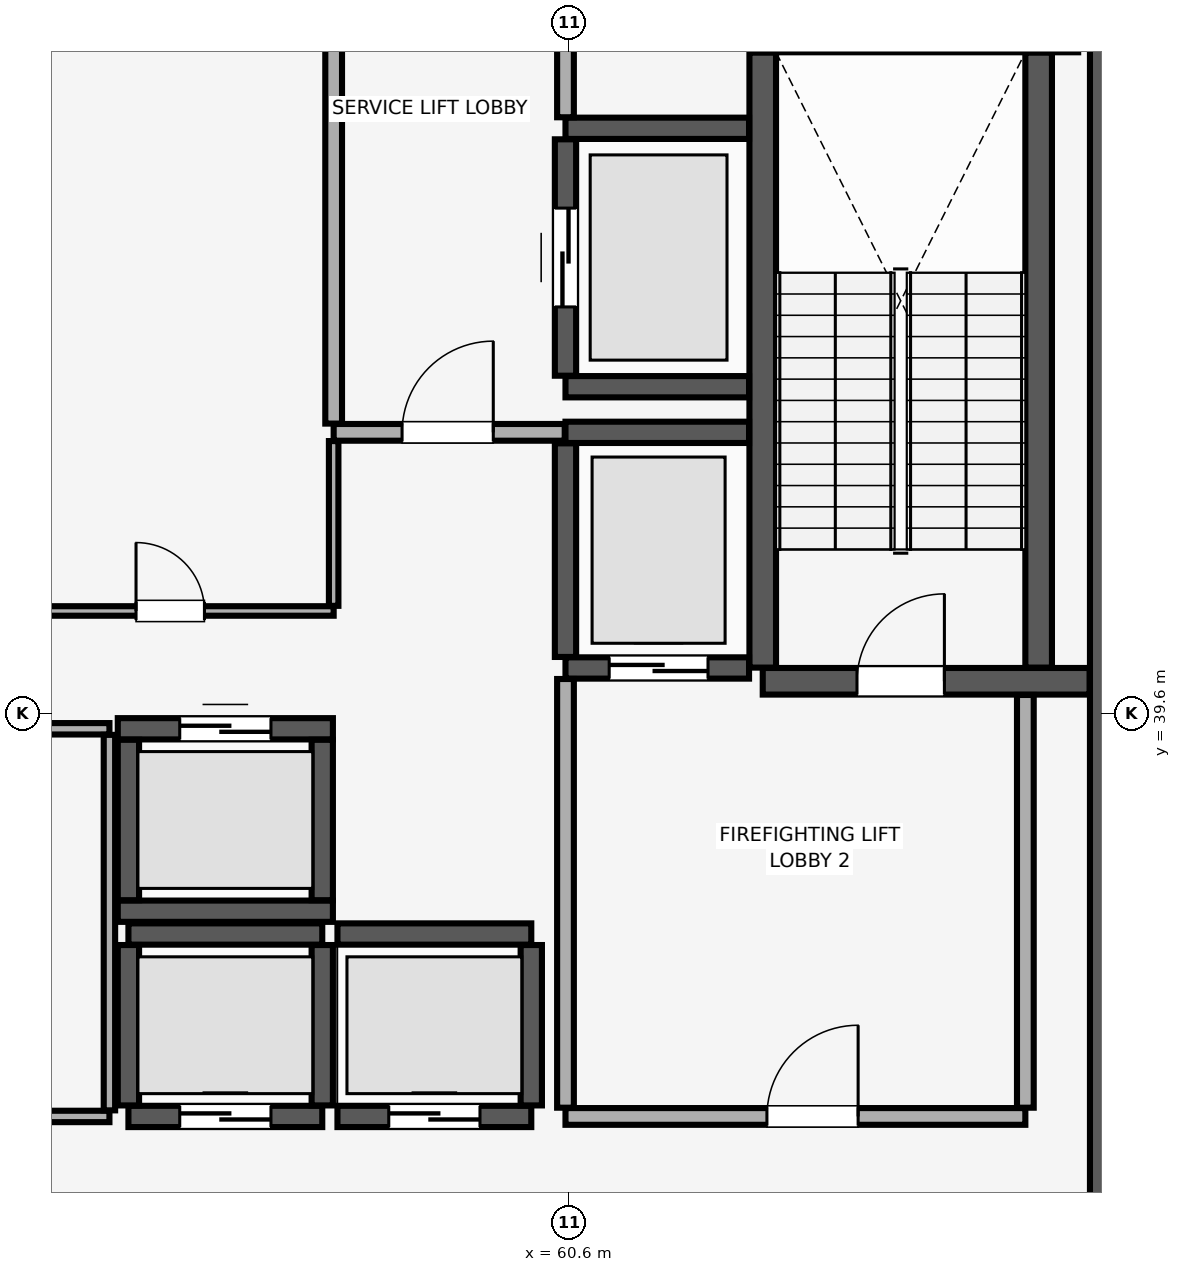
"""IFC4 building model, lengths in metres.
Left out: names, types, materials, properties, quantities, classifications, styles, units other than length and angle.
Written with IfcOpenShell. Run it as: python <this file> out.ifc"""

import sys

from ifc_helpers import new_model, si_unit, direction, frame, frame_2d, origin, place, context, subcontext, project, spatial, rectangle, extrude, element, fill, save


model = new_model("IFC4")
c1 = context("Model", 3, precision=1e-05, world=origin(), true_north=direction((0.0, 1.0)))
c2 = subcontext(c1, "Body", "Model", "MODEL_VIEW")
j1 = project(units=[si_unit("LENGTHUNIT", "METRE"), si_unit("PLANEANGLEUNIT", "RADIAN")], contexts=[c1])
p1 = place(None, origin())
s1 = spatial("IfcSite", under=j1, at=p1, CompositionType="ELEMENT")
p2 = place(p1, origin())
s2 = spatial("IfcBuilding", under=s1, at=p2, CompositionType="ELEMENT")
p3 = place(p2, frame((0.0, 0.0, 305.7)))
s3 = spatial("IfcBuildingStorey", under=s2, at=p3, CompositionType="ELEMENT", Elevation=305.7)
p4 = place(p3, frame((67.8, 29.4, 0.0), z_axis=(0.0, 0.0, 1.0), x_axis=(0.0, 1.0, 0.0)))
e1 = element("IfcWall", 1, at=p4, inside=s3, PredefinedType="SHEAR", context=c2, shape_type="SweptSolid", body=[
    extrude(rectangle(XDim=19.2, YDim=0.7, at=frame_2d((9.6, 0.0))), origin(), (0.0, 0.0, 1.0), 4.7),
])
p5 = place(p3, frame((63.145, 40.025, 0.0), z_axis=(0.0, 0.0, 1.0), x_axis=(1.0, 0.0, 0.0)))
e2 = element("IfcWall", 2, at=p5, inside=s3, PredefinedType="SHEAR", context=c2, shape_type="SweptSolid", body=[
    extrude(rectangle(XDim=4.3, YDim=0.35, at=frame_2d((2.15, 0.0))), origin(), (0.0, 0.0, 1.0), 4.7),
])
p6 = place(p5, frame((1.24, 0.0, 0.0)))
e3 = element("IfcOpeningElement", 3, at=p6, cuts=e2, PredefinedType="OPENING", context=c2, shape_type="SweptSolid", body=[
    extrude(rectangle(XDim=1.15, YDim=2.15, at=frame_2d((0.575, 1.075))), frame((0.0, 0.185, 0.0), z_axis=(0.0, -1.0, 0.0), x_axis=(1.0, 0.0, 0.0)), (0.0, 0.0, 1.0), 0.37),
])
for number, where, z_axis, x_axis in (
    (4, (63.145, 40.205, 0.0), (0.0, 0.0, 1.0), (0.0, 1.0, 0.0)),
    (5, (66.775, 40.205, 0.0), (0.0, 0.0, 1.0), (0.0, 1.0, 0.0)),
):
    element("IfcWall", number, at=place(p3, frame(where, z_axis=z_axis, x_axis=x_axis)), inside=s3, PredefinedType="SHEAR", context=c2, shape_type="SweptSolid", body=[
        extrude(rectangle(XDim=8.09, YDim=0.35, at=frame_2d((4.045, 0.0))), origin(), (0.0, 0.0, 1.0), 4.7),
    ])
p7 = place(p3, frame((54.8, 34.3, 0.0), z_axis=(0.0, 0.0, 1.0), x_axis=(1.0, 0.0, 0.0)))
e6 = element("IfcWall", 6, at=p7, inside=s3, PredefinedType="SHEAR", context=c2, shape_type="SweptSolid", body=[
    extrude(rectangle(XDim=2.55, YDim=0.28, at=frame_2d((1.275, 0.0))), origin(), (0.0, 0.0, 1.0), 4.7),
])
p8 = place(p7, frame((0.675, 0.0, 0.0)))
e7 = element("IfcOpeningElement", 7, at=p8, cuts=e6, PredefinedType="OPENING", context=c2, shape_type="SweptSolid", body=[
    extrude(rectangle(XDim=1.2, YDim=2.25, at=frame_2d((0.6, 1.125))), frame((0.0, 0.15, 0.0), z_axis=(0.0, -1.0, 0.0), x_axis=(1.0, 0.0, 0.0)), (0.0, 0.0, 1.0), 0.3),
])
p9 = place(p3, frame((54.8, 36.7, 0.0), z_axis=(0.0, 0.0, 1.0), x_axis=(1.0, 0.0, 0.0)))
e8 = element("IfcWall", 8, at=p9, inside=s3, PredefinedType="SHEAR", context=c2, shape_type="SweptSolid", body=[
    extrude(rectangle(XDim=2.55, YDim=0.28, at=frame_2d((1.275, 0.0))), origin(), (0.0, 0.0, 1.0), 4.7),
])
for number, where, z_axis, x_axis in (
    (9, (54.8, 34.445, 0.0), (0.0, 0.0, 1.0), (0.0, 1.0, 0.0)),
    (10, (57.35, 34.445, 0.0), (0.0, 0.0, 1.0), (0.0, 1.0, 0.0)),
):
    element("IfcWall", number, at=place(p3, frame(where, z_axis=z_axis, x_axis=x_axis)), inside=s3, PredefinedType="SHEAR", context=c2, shape_type="SweptSolid", body=[
        extrude(rectangle(XDim=2.11, YDim=0.28, at=frame_2d((1.055, 0.0))), origin(), (0.0, 0.0, 1.0), 4.7),
    ])
p10 = place(p3, frame((57.55, 34.3, 0.0), z_axis=(0.0, 0.0, 1.0), x_axis=(1.0, 0.0, 0.0)))
e11 = element("IfcWall", 11, at=p10, inside=s3, PredefinedType="SHEAR", context=c2, shape_type="SweptSolid", body=[
    extrude(rectangle(XDim=2.55, YDim=0.28, at=frame_2d((1.275, 0.0))), origin(), (0.0, 0.0, 1.0), 4.7),
])
p11 = place(p10, frame((0.675, 0.0, 0.0)))
e12 = element("IfcOpeningElement", 12, at=p11, cuts=e11, PredefinedType="OPENING", context=c2, shape_type="SweptSolid", body=[
    extrude(rectangle(XDim=1.2, YDim=2.25, at=frame_2d((0.6, 1.125))), frame((0.0, 0.15, 0.0), z_axis=(0.0, -1.0, 0.0), x_axis=(1.0, 0.0, 0.0)), (0.0, 0.0, 1.0), 0.3),
])
p12 = place(p3, frame((57.55, 36.7, 0.0), z_axis=(0.0, 0.0, 1.0), x_axis=(1.0, 0.0, 0.0)))
e13 = element("IfcWall", 13, at=p12, inside=s3, PredefinedType="SHEAR", context=c2, shape_type="SweptSolid", body=[
    extrude(rectangle(XDim=2.55, YDim=0.28, at=frame_2d((1.275, 0.0))), origin(), (0.0, 0.0, 1.0), 4.7),
])
p13 = place(p3, frame((60.1, 34.445, 0.0), z_axis=(0.0, 0.0, 1.0), x_axis=(0.0, 1.0, 0.0)))
e14 = element("IfcWall", 14, at=p13, inside=s3, PredefinedType="SHEAR", context=c2, shape_type="SweptSolid", body=[
    extrude(rectangle(XDim=2.11, YDim=0.28, at=frame_2d((1.055, 0.0))), origin(), (0.0, 0.0, 1.0), 4.7),
])
p14 = place(p3, frame((54.66, 37.0, 0.0), z_axis=(0.0, 0.0, 1.0), x_axis=(1.0, 0.0, 0.0)))
e15 = element("IfcWall", 15, at=p14, inside=s3, PredefinedType="SHEAR", context=c2, shape_type="SweptSolid", body=[
    extrude(rectangle(XDim=2.83, YDim=0.28, at=frame_2d((1.415, 0.0))), origin(), (0.0, 0.0, 1.0), 4.7),
])
p15 = place(p3, frame((54.66, 39.4, 0.0), z_axis=(0.0, 0.0, 1.0), x_axis=(1.0, 0.0, 0.0)))
e16 = element("IfcWall", 16, at=p15, inside=s3, PredefinedType="SHEAR", context=c2, shape_type="SweptSolid", body=[
    extrude(rectangle(XDim=2.83, YDim=0.28, at=frame_2d((1.415, 0.0))), origin(), (0.0, 0.0, 1.0), 4.7),
])
p16 = place(p15, frame((0.815, 0.0, 0.0)))
e17 = element("IfcOpeningElement", 17, at=p16, cuts=e16, PredefinedType="OPENING", context=c2, shape_type="SweptSolid", body=[
    extrude(rectangle(XDim=1.2, YDim=2.25, at=frame_2d((0.6, 1.125))), frame((0.0, 0.15, 0.0), z_axis=(0.0, -1.0, 0.0), x_axis=(1.0, 0.0, 0.0)), (0.0, 0.0, 1.0), 0.3),
])
for number, where, z_axis, x_axis in (
    (18, (54.8, 37.145, 0.0), (0.0, 0.0, 1.0), (0.0, 1.0, 0.0)),
    (19, (57.35, 37.145, 0.0), (0.0, 0.0, 1.0), (0.0, 1.0, 0.0)),
):
    element("IfcWall", number, at=place(p3, frame(where, z_axis=z_axis, x_axis=x_axis)), inside=s3, PredefinedType="SHEAR", context=c2, shape_type="SweptSolid", body=[
        extrude(rectangle(XDim=2.11, YDim=0.28, at=frame_2d((1.055, 0.0))), origin(), (0.0, 0.0, 1.0), 4.7),
    ])
p17 = place(p3, frame((60.55, 40.2, 0.0), z_axis=(0.0, 0.0, 1.0), x_axis=(1.0, 0.0, 0.0)))
e20 = element("IfcWall", 20, at=p17, inside=s3, PredefinedType="SHEAR", context=c2, shape_type="SweptSolid", body=[
    extrude(rectangle(XDim=2.415, YDim=0.28, at=frame_2d((1.208, 0.0))), origin(), (0.0, 0.0, 1.0), 4.7),
])
p18 = place(p17, frame((0.575, 0.0, 0.0)))
e21 = element("IfcOpeningElement", 21, at=p18, cuts=e20, PredefinedType="OPENING", context=c2, shape_type="SweptSolid", body=[
    extrude(rectangle(XDim=1.3, YDim=2.3, at=frame_2d((0.65, 1.15))), frame((0.0, 0.15, 0.0), z_axis=(0.0, -1.0, 0.0), x_axis=(1.0, 0.0, 0.0)), (0.0, 0.0, 1.0), 0.3),
])
p19 = place(p3, frame((60.55, 43.3, 0.0), z_axis=(0.0, 0.0, 1.0), x_axis=(1.0, 0.0, 0.0)))
e22 = element("IfcWall", 22, at=p19, inside=s3, PredefinedType="SHEAR", context=c2, shape_type="SweptSolid", body=[
    extrude(rectangle(XDim=2.415, YDim=0.28, at=frame_2d((1.208, 0.0))), origin(), (0.0, 0.0, 1.0), 4.7),
])
p20 = place(p3, frame((60.55, 40.345, 0.0), z_axis=(0.0, 0.0, 1.0), x_axis=(0.0, 1.0, 0.0)))
e23 = element("IfcWall", 23, at=p20, inside=s3, PredefinedType="SHEAR", context=c2, shape_type="SweptSolid", body=[
    extrude(rectangle(XDim=2.81, YDim=0.28, at=frame_2d((1.405, 0.0))), origin(), (0.0, 0.0, 1.0), 4.7),
])
for number, where, z_axis, x_axis in (
    (24, (60.55, 43.9, 0.0), (0.0, 0.0, 1.0), (1.0, 0.0, 0.0)),
    (25, (60.55, 47.3, 0.0), (0.0, 0.0, 1.0), (1.0, 0.0, 0.0)),
):
    element("IfcWall", number, at=place(p3, frame(where, z_axis=z_axis, x_axis=x_axis)), inside=s3, PredefinedType="SHEAR", context=c2, shape_type="SweptSolid", body=[
        extrude(rectangle(XDim=2.415, YDim=0.28, at=frame_2d((1.208, 0.0))), origin(), (0.0, 0.0, 1.0), 4.7),
    ])
p21 = place(p3, frame((60.55, 44.045, 0.0), z_axis=(0.0, 0.0, 1.0), x_axis=(0.0, 1.0, 0.0)))
e26 = element("IfcWall", 26, at=p21, inside=s3, PredefinedType="SHEAR", context=c2, shape_type="SweptSolid", body=[
    extrude(rectangle(XDim=3.11, YDim=0.28, at=frame_2d((1.555, 0.0))), origin(), (0.0, 0.0, 1.0), 4.7),
])
p22 = place(p21, frame((0.905, 0.0, 0.0)))
e27 = element("IfcOpeningElement", 27, at=p22, cuts=e26, PredefinedType="OPENING", context=c2, shape_type="SweptSolid", body=[
    extrude(rectangle(XDim=1.3, YDim=2.3, at=frame_2d((0.65, 1.15))), frame((0.0, 0.15, 0.0), z_axis=(0.0, -1.0, 0.0), x_axis=(1.0, 0.0, 0.0)), (0.0, 0.0, 1.0), 0.3),
])
p23 = place(p3, frame((60.55, 34.3, 0.0), z_axis=(0.0, 0.0, 1.0), x_axis=(1.0, 0.0, 0.0)))
e28 = element("IfcWall", 28, at=p23, inside=s3, PredefinedType="PARTITIONING", context=c2, shape_type="SweptSolid", body=[
    extrude(rectangle(XDim=6.05, YDim=0.22, at=frame_2d((3.025, 0.0))), origin(), (0.0, 0.0, 1.0), 4.7),
])
p24 = place(p23, frame((2.65, 0.0, 0.0)))
e29 = element("IfcOpeningElement", 29, at=p24, cuts=e28, PredefinedType="OPENING", context=c2, shape_type="SweptSolid", body=[
    extrude(rectangle(XDim=1.2, YDim=2.15, at=frame_2d((0.6, 1.075))), frame((0.0, 0.12, 0.0), z_axis=(0.0, -1.0, 0.0), x_axis=(1.0, 0.0, 0.0)), (0.0, 0.0, 1.0), 0.24),
])
p25 = place(p3, frame((60.55, 34.415, 0.0), z_axis=(0.0, 0.0, 1.0), x_axis=(0.0, 1.0, 0.0)))
e30 = element("IfcWall", 30, at=p25, inside=s3, PredefinedType="PARTITIONING", context=c2, shape_type="SweptSolid", body=[
    extrude(rectangle(XDim=5.64, YDim=0.22, at=frame_2d((2.82, 0.0))), origin(), (0.0, 0.0, 1.0), 4.7),
])
p26 = place(p3, frame((66.6, 34.415, 0.0), z_axis=(0.0, 0.0, 1.0), x_axis=(0.0, 1.0, 0.0)))
e31 = element("IfcWall", 31, at=p26, inside=s3, PredefinedType="PARTITIONING", context=c2, shape_type="SweptSolid", body=[
    extrude(rectangle(XDim=5.43, YDim=0.22, at=frame_2d((2.715, 0.0))), origin(), (0.0, 0.0, 1.0), 4.7),
])
p27 = place(p3, frame((57.5, 43.3, 0.0), z_axis=(0.0, 0.0, 1.0), x_axis=(1.0, 0.0, 0.0)))
e32 = element("IfcWall", 32, at=p27, inside=s3, PredefinedType="PARTITIONING", context=c2, shape_type="SweptSolid", body=[
    extrude(rectangle(XDim=3.04, YDim=0.22, at=frame_2d((1.52, 0.0))), origin(), (0.0, 0.0, 1.0), 4.7),
])
p28 = place(p27, frame((0.9, 0.0, 0.0)))
e33 = element("IfcOpeningElement", 33, at=p28, cuts=e32, PredefinedType="OPENING", context=c2, shape_type="SweptSolid", body=[
    extrude(rectangle(XDim=1.2, YDim=2.15, at=frame_2d((0.6, 1.075))), frame((0.0, 0.12, 0.0), z_axis=(0.0, -1.0, 0.0), x_axis=(1.0, 0.0, 0.0)), (0.0, 0.0, 1.0), 0.24),
])
p29 = place(p3, frame((57.5, 43.415, 0.0), z_axis=(0.0, 0.0, 1.0), x_axis=(0.0, 1.0, 0.0)))
e34 = element("IfcWall", 34, at=p29, inside=s3, PredefinedType="PARTITIONING", context=c2, shape_type="SweptSolid", body=[
    extrude(rectangle(XDim=5.435, YDim=0.22, at=frame_2d((2.718, 0.0))), origin(), (0.0, 0.0, 1.0), 4.7),
])
p30 = place(p3, frame((60.55, 47.445, 0.0), z_axis=(0.0, 0.0, 1.0), x_axis=(0.0, 1.0, 0.0)))
e35 = element("IfcWall", 35, at=p30, inside=s3, PredefinedType="PARTITIONING", context=c2, shape_type="SweptSolid", body=[
    extrude(rectangle(XDim=1.405, YDim=0.22, at=frame_2d((0.703, 0.0))), origin(), (0.0, 0.0, 1.0), 4.7),
])
p31 = place(p3, frame((46.6, 34.3, 0.0), z_axis=(0.0, 0.0, 1.0), x_axis=(1.0, 0.0, 0.0)))
e36 = element("IfcWall", 36, at=p31, inside=s3, PredefinedType="PARTITIONING", context=c2, shape_type="SweptSolid", body=[
    extrude(rectangle(XDim=7.95, YDim=0.15, at=frame_2d((3.975, 0.0))), origin(), (0.0, 0.0, 1.0), 4.7),
])
p32 = place(p31, frame((3.4, 0.0, 0.0)))
e37 = element("IfcOpeningElement", 37, at=p32, cuts=e36, PredefinedType="OPENING", context=c2, shape_type="SweptSolid", body=[
    extrude(rectangle(XDim=1.0, YDim=2.15, at=frame_2d((0.5, 1.075))), frame((0.0, 0.085, 0.0), z_axis=(0.0, -1.0, 0.0), x_axis=(1.0, 0.0, 0.0)), (0.0, 0.0, 1.0), 0.17),
])
p33 = place(p3, frame((46.6, 39.4, 0.0), z_axis=(0.0, 0.0, 1.0), x_axis=(1.0, 0.0, 0.0)))
e38 = element("IfcWall", 38, at=p33, inside=s3, PredefinedType="PARTITIONING", context=c2, shape_type="SweptSolid", body=[
    extrude(rectangle(XDim=7.95, YDim=0.15, at=frame_2d((3.975, 0.0))), origin(), (0.0, 0.0, 1.0), 4.7),
])
p34 = place(p3, frame((54.55, 34.38, 0.0), z_axis=(0.0, 0.0, 1.0), x_axis=(0.0, 1.0, 0.0)))
e39 = element("IfcWall", 39, at=p34, inside=s3, PredefinedType="PARTITIONING", context=c2, shape_type="SweptSolid", body=[
    extrude(rectangle(XDim=4.94, YDim=0.15, at=frame_2d((2.47, 0.0))), origin(), (0.0, 0.0, 1.0), 4.7),
])
p35 = place(p3, frame((53.268, 40.95, 0.0), z_axis=(0.0, 0.0, 1.0), x_axis=(1.0, 0.0, 0.0)))
e40 = element("IfcWall", 40, at=p35, inside=s3, PredefinedType="PARTITIONING", context=c2, shape_type="SweptSolid", body=[
    extrude(rectangle(XDim=4.232, YDim=0.125, at=frame_2d((2.116, 0.0))), origin(), (0.0, 0.0, 1.0), 4.7),
])
p36 = place(p35, frame((1.633, 0.0, 0.0)))
e41 = element("IfcOpeningElement", 41, at=p36, cuts=e40, PredefinedType="OPENING", context=c2, shape_type="SweptSolid", body=[
    extrude(rectangle(XDim=0.9, YDim=2.1, at=frame_2d((0.45, 1.05))), frame((0.0, 0.073, 0.0), z_axis=(0.0, -1.0, 0.0), x_axis=(1.0, 0.0, 0.0)), (0.0, 0.0, 1.0), 0.145),
])
p37 = place(p3, frame((57.5, 41.018, 0.0), z_axis=(0.0, 0.0, 1.0), x_axis=(0.0, 1.0, 0.0)))
e42 = element("IfcWall", 42, at=p37, inside=s3, PredefinedType="PARTITIONING", context=c2, shape_type="SweptSolid", body=[
    extrude(rectangle(XDim=2.167, YDim=0.125, at=frame_2d((1.084, 0.0))), origin(), (0.0, 0.0, 1.0), 4.7),
])
p38 = place(p6, origin())
e43 = element("IfcDoor", 43, at=p38, inside=s3, OperationType="SINGLE_SWING_RIGHT", PredefinedType="DOOR", context=c2, shape_type="SweptSolid", body=[
    extrude(rectangle(XDim=1.15, YDim=2.15, at=frame_2d((0.575, 1.075))), frame((0.0, 0.025, 0.0), z_axis=(0.0, -1.0, 0.0), x_axis=(1.0, 0.0, 0.0)), (0.0, 0.0, 1.0), 0.05),
])
fill(e3, e43)
p39 = place(p8, origin())
e44 = element("IfcDoor", 44, at=p39, inside=s3, OperationType="DOUBLE_DOOR_SLIDING", PredefinedType="DOOR", context=c2, shape_type="SweptSolid", body=[
    extrude(rectangle(XDim=1.2, YDim=2.25, at=frame_2d((0.6, 1.125))), frame((0.0, 0.025, 0.0), z_axis=(0.0, -1.0, 0.0), x_axis=(1.0, 0.0, 0.0)), (0.0, 0.0, 1.0), 0.05),
])
fill(e7, e44)
p40 = place(p11, origin())
e45 = element("IfcDoor", 45, at=p40, inside=s3, OperationType="DOUBLE_DOOR_SLIDING", PredefinedType="DOOR", context=c2, shape_type="SweptSolid", body=[
    extrude(rectangle(XDim=1.2, YDim=2.25, at=frame_2d((0.6, 1.125))), frame((0.0, 0.025, 0.0), z_axis=(0.0, -1.0, 0.0), x_axis=(1.0, 0.0, 0.0)), (0.0, 0.0, 1.0), 0.05),
])
fill(e12, e45)
p41 = place(p16, origin())
e46 = element("IfcDoor", 46, at=p41, inside=s3, OperationType="DOUBLE_DOOR_SLIDING", PredefinedType="DOOR", context=c2, shape_type="SweptSolid", body=[
    extrude(rectangle(XDim=1.2, YDim=2.25, at=frame_2d((0.6, 1.125))), frame((0.0, 0.025, 0.0), z_axis=(0.0, -1.0, 0.0), x_axis=(1.0, 0.0, 0.0)), (0.0, 0.0, 1.0), 0.05),
])
fill(e17, e46)
p42 = place(p18, origin())
e47 = element("IfcDoor", 47, at=p42, inside=s3, OperationType="DOUBLE_DOOR_SLIDING", PredefinedType="DOOR", context=c2, shape_type="SweptSolid", body=[
    extrude(rectangle(XDim=1.3, YDim=2.3, at=frame_2d((0.65, 1.15))), frame((0.0, 0.025, 0.0), z_axis=(0.0, -1.0, 0.0), x_axis=(1.0, 0.0, 0.0)), (0.0, 0.0, 1.0), 0.05),
])
fill(e21, e47)
p43 = place(p22, origin())
e48 = element("IfcDoor", 48, at=p43, inside=s3, OperationType="DOUBLE_DOOR_SLIDING", PredefinedType="DOOR", context=c2, shape_type="SweptSolid", body=[
    extrude(rectangle(XDim=1.3, YDim=2.3, at=frame_2d((0.65, 1.15))), frame((0.0, 0.025, 0.0), z_axis=(0.0, -1.0, 0.0), x_axis=(1.0, 0.0, 0.0)), (0.0, 0.0, 1.0), 0.05),
])
fill(e27, e48)
p44 = place(p24, origin())
e49 = element("IfcDoor", 49, at=p44, inside=s3, OperationType="SINGLE_SWING_RIGHT", PredefinedType="DOOR", context=c2, shape_type="SweptSolid", body=[
    extrude(rectangle(XDim=1.2, YDim=2.15, at=frame_2d((0.6, 1.075))), frame((0.0, 0.025, 0.0), z_axis=(0.0, -1.0, 0.0), x_axis=(1.0, 0.0, 0.0)), (0.0, 0.0, 1.0), 0.05),
])
fill(e29, e49)
p45 = place(p28, origin())
e50 = element("IfcDoor", 50, at=p45, inside=s3, OperationType="SINGLE_SWING_RIGHT", PredefinedType="DOOR", context=c2, shape_type="SweptSolid", body=[
    extrude(rectangle(XDim=1.2, YDim=2.15, at=frame_2d((0.6, 1.075))), frame((0.0, 0.025, 0.0), z_axis=(0.0, -1.0, 0.0), x_axis=(1.0, 0.0, 0.0)), (0.0, 0.0, 1.0), 0.05),
])
fill(e33, e50)
p46 = place(p36, origin())
e51 = element("IfcDoor", 51, at=p46, inside=s3, OperationType="SINGLE_SWING_LEFT", PredefinedType="DOOR", context=c2, shape_type="SweptSolid", body=[
    extrude(rectangle(XDim=0.9, YDim=2.1, at=frame_2d((0.45, 1.05))), frame((0.0, 0.025, 0.0), z_axis=(0.0, -1.0, 0.0), x_axis=(1.0, 0.0, 0.0)), (0.0, 0.0, 1.0), 0.05),
])
fill(e41, e51)
save(model, sys.argv[1])
